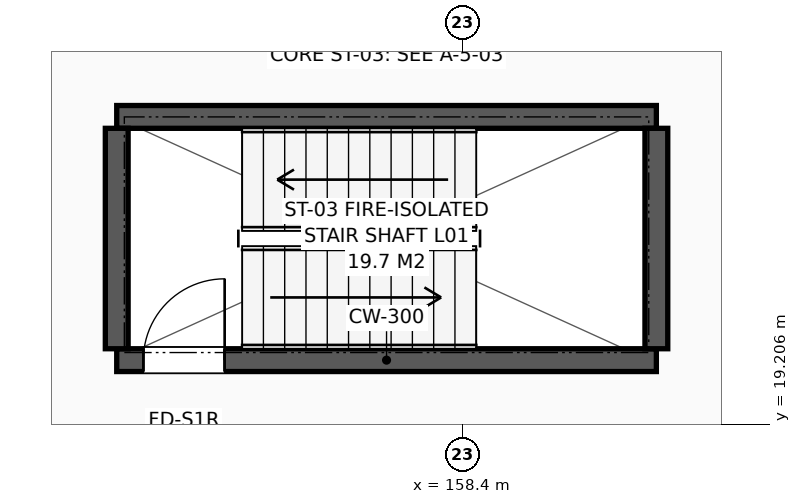
"""IFC4 building model, lengths in metres.
Left out: names, types, materials, properties, quantities, classifications, styles, units other than length and angle.
Written with IfcOpenShell. Run it as: python <this file> out.ifc"""

import sys

from ifc_helpers import new_model, si_unit, direction, frame, frame_2d, origin, place, context, subcontext, project, spatial, rectangle, extrude, element, fill, save


model = new_model("IFC4")
c1 = context("Model", 3, precision=1e-05, world=origin(), true_north=direction((0.0, 1.0)))
c2 = subcontext(c1, "Body", "Model", "MODEL_VIEW")
j1 = project(units=[si_unit("LENGTHUNIT", "METRE"), si_unit("PLANEANGLEUNIT", "RADIAN")], contexts=[c1])
p1 = place(None, origin())
s1 = spatial("IfcSite", under=j1, at=p1, CompositionType="ELEMENT")
p2 = place(p1, origin())
s2 = spatial("IfcBuilding", under=s1, at=p2, CompositionType="ELEMENT")
p3 = place(p2, frame((0.0, 0.0, 4.8)))
s3 = spatial("IfcBuildingStorey", under=s2, at=p3, CompositionType="ELEMENT", Elevation=4.8)
p4 = place(p3, frame((153.85, 20.05, 0.0), z_axis=(0.0, 0.0, 1.0), x_axis=(1.0, 0.0, 0.0)))
e1 = element("IfcWall", 1, at=p4, inside=s3, PredefinedType="SHEAR", context=c2, shape_type="SweptSolid", body=[
    extrude(rectangle(XDim=7.1, YDim=0.3, at=frame_2d((3.55, 0.0))), origin(), (0.0, 0.0, 1.0), 3.84),
])
p5 = place(p4, frame((0.35, 0.0, 0.0)))
e2 = element("IfcOpeningElement", 2, at=p5, cuts=e1, PredefinedType="OPENING", context=c2, shape_type="SweptSolid", body=[
    extrude(rectangle(XDim=1.07, YDim=2.15, at=frame_2d((0.535, 1.075))), frame((0.0, 0.16, 0.0), z_axis=(0.0, -1.0, 0.0), x_axis=(1.0, 0.0, 0.0)), (0.0, 0.0, 1.0), 0.32),
])
p6 = place(p3, frame((160.95, 23.25, 0.0), z_axis=(0.0, 0.0, 1.0), x_axis=(-1.0, 0.0, 0.0)))
e3 = element("IfcWall", 3, at=p6, inside=s3, PredefinedType="SHEAR", context=c2, shape_type="SweptSolid", body=[
    extrude(rectangle(XDim=7.1, YDim=0.3, at=frame_2d((3.55, 0.0))), origin(), (0.0, 0.0, 1.0), 3.84),
])
for number, where, z_axis, x_axis in (
    (4, (160.95, 20.2, 0.0), (0.0, 0.0, 1.0), (0.0, 1.0, 0.0)),
    (5, (153.85, 23.1, 0.0), (0.0, 0.0, 1.0), (0.0, -1.0, 0.0)),
):
    element("IfcWall", number, at=place(p3, frame(where, z_axis=z_axis, x_axis=x_axis)), inside=s3, PredefinedType="SHEAR", context=c2, shape_type="SweptSolid", body=[
        extrude(rectangle(XDim=2.9, YDim=0.3, at=frame_2d((1.45, 0.0))), origin(), (0.0, 0.0, 1.0), 3.84),
    ])
p7 = place(p5, origin())
e6 = element("IfcDoor", 6, at=p7, inside=s3, OperationType="SINGLE_SWING_RIGHT", PredefinedType="DOOR", context=c2, shape_type="SweptSolid", body=[
    extrude(rectangle(XDim=1.07, YDim=2.15, at=frame_2d((0.535, 1.075))), frame((0.0, 0.025, 0.0), z_axis=(0.0, -1.0, 0.0), x_axis=(1.0, 0.0, 0.0)), (0.0, 0.0, 1.0), 0.05),
])
fill(e2, e6)
save(model, sys.argv[1])
